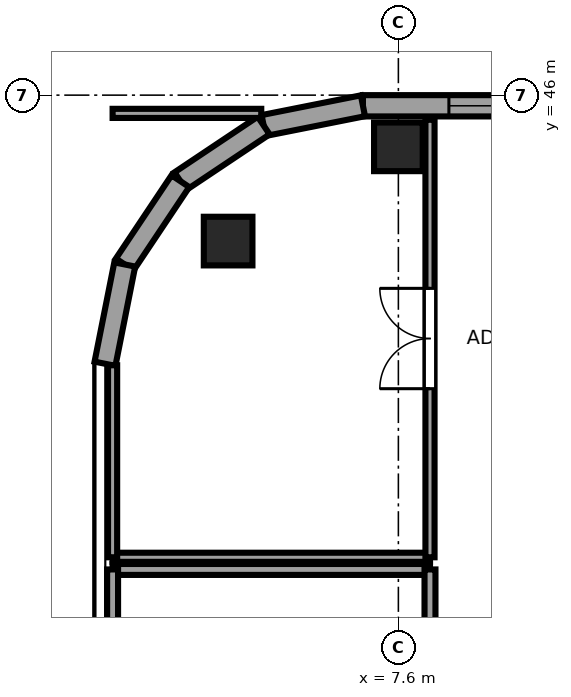
"""IFC4 building model, lengths in metres.
Left out: names, types, materials, properties, quantities, classifications, styles, units other than length and angle.
Written with IfcOpenShell. Run it as: python <this file> out.ifc"""

import sys

from ifc_helpers import new_model, si_unit, direction, frame, frame_2d, origin, origin_2d, place, context, subcontext, project, spatial, rectangle, extrude, source, transform, mapped, element, fill, save


model = new_model("IFC4")
c1 = context("Model", 3, precision=1e-05, world=origin(), true_north=direction((0.0, 1.0)))
c2 = subcontext(c1, "Body", "Model", "MODEL_VIEW")
j1 = project(units=[si_unit("LENGTHUNIT", "METRE"), si_unit("PLANEANGLEUNIT", "RADIAN")], contexts=[c1])
p1 = place(None, origin())
s1 = spatial("IfcSite", under=j1, at=p1, CompositionType="ELEMENT")
p2 = place(p1, origin())
s2 = spatial("IfcBuilding", under=s1, at=p2, CompositionType="ELEMENT")
p3 = place(p2, frame((0.0, 0.0, 194.65)))
s3 = spatial("IfcBuildingStorey", under=s2, at=p3, CompositionType="ELEMENT", Elevation=194.65)
m1 = source(origin(), c2, "Body", "SweptSolid", [
    extrude(rectangle(XDim=0.8, YDim=0.8, at=origin_2d()), origin(), (0.0, 0.0, 1.0), 3.55),
])
for number, where, z_axis, x_axis in (
    (1, (4.8, 43.6, 0.0), (0.0, 0.0, 1.0), (1.0, 0.0, 0.0)),
    (2, (7.6, 45.15, 0.0), (0.0, 0.0, 1.0), (1.0, 0.0, 0.0)),
):
    element("IfcColumn", number, at=place(p3, frame(where, z_axis=z_axis, x_axis=x_axis)), inside=s3, PredefinedType="COLUMN", context=c2, shape_type="MappedRepresentation", body=[
        mapped(m1, transform((0.0, 0.0, 0.0), x_axis=(1.0, 0.0, 0.0), y_axis=(0.0, 1.0, 0.0), z_axis=(0.0, 0.0, 1.0), scale=1.0)),
    ])
p4 = place(p3, frame((49.983, 45.825, 0.0), z_axis=(0.0, 0.0, 1.0), x_axis=(-1.0, 0.0, 0.0)))
e3 = element("IfcWall", 3, at=p4, inside=s3, PredefinedType="SOLIDWALL", context=c2, shape_type="SweptSolid", body=[
    extrude(rectangle(XDim=42.966, YDim=0.35, at=frame_2d((21.483, 0.0))), origin(), (0.0, 0.0, 1.0), 3.37),
])
p5 = place(p4, frame((1.963, 0.0, 0.68)))
e4 = element("IfcOpeningElement", 4, at=p5, cuts=e3, PredefinedType="OPENING", context=c2, shape_type="SweptSolid", body=[
    extrude(rectangle(XDim=2.55, YDim=1.92, at=frame_2d((1.275, 0.96))), frame((0.0, 0.185, 0.0), z_axis=(0.0, -1.0, 0.0), x_axis=(1.0, 0.0, 0.0)), (0.0, 0.0, 1.0), 0.37),
])
p6 = place(p4, frame((9.766, 0.0, 0.68)))
e5 = element("IfcOpeningElement", 5, at=p6, cuts=e3, PredefinedType="OPENING", context=c2, shape_type="SweptSolid", body=[
    extrude(rectangle(XDim=2.55, YDim=1.92, at=frame_2d((1.275, 0.96))), frame((0.0, 0.185, 0.0), z_axis=(0.0, -1.0, 0.0), x_axis=(1.0, 0.0, 0.0)), (0.0, 0.0, 1.0), 0.37),
])
p7 = place(p4, frame((13.943, 0.0, 0.68)))
e6 = element("IfcOpeningElement", 6, at=p7, cuts=e3, PredefinedType="OPENING", context=c2, shape_type="SweptSolid", body=[
    extrude(rectangle(XDim=2.55, YDim=1.92, at=frame_2d((1.275, 0.96))), frame((0.0, 0.185, 0.0), z_axis=(0.0, -1.0, 0.0), x_axis=(1.0, 0.0, 0.0)), (0.0, 0.0, 1.0), 0.37),
])
p8 = place(p4, frame((18.12, 0.0, 0.68)))
e7 = element("IfcOpeningElement", 7, at=p8, cuts=e3, PredefinedType="OPENING", context=c2, shape_type="SweptSolid", body=[
    extrude(rectangle(XDim=2.55, YDim=1.92, at=frame_2d((1.275, 0.96))), frame((0.0, 0.185, 0.0), z_axis=(0.0, -1.0, 0.0), x_axis=(1.0, 0.0, 0.0)), (0.0, 0.0, 1.0), 0.37),
])
p9 = place(p4, frame((22.296, 0.0, 0.68)))
e8 = element("IfcOpeningElement", 8, at=p9, cuts=e3, PredefinedType="OPENING", context=c2, shape_type="SweptSolid", body=[
    extrude(rectangle(XDim=2.55, YDim=1.92, at=frame_2d((1.275, 0.96))), frame((0.0, 0.185, 0.0), z_axis=(0.0, -1.0, 0.0), x_axis=(1.0, 0.0, 0.0)), (0.0, 0.0, 1.0), 0.37),
])
p10 = place(p4, frame((26.473, 0.0, 0.68)))
e9 = element("IfcOpeningElement", 9, at=p10, cuts=e3, PredefinedType="OPENING", context=c2, shape_type="SweptSolid", body=[
    extrude(rectangle(XDim=2.55, YDim=1.92, at=frame_2d((1.275, 0.96))), frame((0.0, 0.185, 0.0), z_axis=(0.0, -1.0, 0.0), x_axis=(1.0, 0.0, 0.0)), (0.0, 0.0, 1.0), 0.37),
])
p11 = place(p4, frame((30.649, 0.0, 0.68)))
e10 = element("IfcOpeningElement", 10, at=p11, cuts=e3, PredefinedType="OPENING", context=c2, shape_type="SweptSolid", body=[
    extrude(rectangle(XDim=2.55, YDim=1.92, at=frame_2d((1.275, 0.96))), frame((0.0, 0.185, 0.0), z_axis=(0.0, -1.0, 0.0), x_axis=(1.0, 0.0, 0.0)), (0.0, 0.0, 1.0), 0.37),
])
p12 = place(p4, frame((34.826, 0.0, 0.68)))
e11 = element("IfcOpeningElement", 11, at=p12, cuts=e3, PredefinedType="OPENING", context=c2, shape_type="SweptSolid", body=[
    extrude(rectangle(XDim=2.55, YDim=1.92, at=frame_2d((1.275, 0.96))), frame((0.0, 0.185, 0.0), z_axis=(0.0, -1.0, 0.0), x_axis=(1.0, 0.0, 0.0)), (0.0, 0.0, 1.0), 0.37),
])
p13 = place(p4, frame((39.002, 0.0, 0.68)))
e12 = element("IfcOpeningElement", 12, at=p13, cuts=e3, PredefinedType="OPENING", context=c2, shape_type="SweptSolid", body=[
    extrude(rectangle(XDim=2.55, YDim=1.92, at=frame_2d((1.275, 0.96))), frame((0.0, 0.185, 0.0), z_axis=(0.0, -1.0, 0.0), x_axis=(1.0, 0.0, 0.0)), (0.0, 0.0, 1.0), 0.37),
])
p14 = place(p3, frame((7.017, 45.825, 0.0), z_axis=(0.0, 0.0, 1.0), x_axis=(-0.980788844421, -0.195072403631, 0.0)))
e13 = element("IfcWall", 13, at=p14, inside=s3, PredefinedType="SOLIDWALL", context=c2, shape_type="SweptSolid", body=[
    extrude(rectangle(XDim=1.665, YDim=0.35, at=frame_2d((0.832, 0.0))), origin(), (0.0, 0.0, 1.0), 3.37),
])
for number, where, z_axis, x_axis in (
    (14, (5.385, 45.5, 0.0), (0.0, 0.0, 1.0), (-0.832, -0.556, 0.0)),
    (15, (4.015, 44.585, 0.0), (0.0, 0.0, 1.0), (-0.556, -0.831, 0.0)),
):
    element("IfcWall", number, at=place(p3, frame(where, z_axis=z_axis, x_axis=x_axis)), inside=s3, PredefinedType="SOLIDWALL", context=c2, shape_type="SweptSolid", body=[
        extrude(rectangle(XDim=1.647, YDim=0.35, at=frame_2d((0.824, 0.0))), origin(), (0.0, 0.0, 1.0), 2.832),
    ])
p15 = place(p3, frame((3.1, 43.216, 0.0), z_axis=(0.0, 0.0, 1.0), x_axis=(-0.195044345786, -0.980794424524, 0.0)))
e16 = element("IfcWall", 16, at=p15, inside=s3, PredefinedType="SOLIDWALL", context=c2, shape_type="SweptSolid", body=[
    extrude(rectangle(XDim=1.665, YDim=0.35, at=frame_2d((0.833, 0.0))), origin(), (0.0, 0.0, 1.0), 3.37),
])
p16 = place(p3, frame((2.9, 38.2, 0.0), z_axis=(0.0, 0.0, 1.0), x_axis=(1.0, 0.0, 0.0)))
e17 = element("IfcWall", 17, at=p16, inside=s3, PredefinedType="PARTITIONING", context=c2, shape_type="SweptSolid", body=[
    extrude(rectangle(XDim=5.22, YDim=0.18, at=frame_2d((2.61, 0.0))), origin(), (0.0, 0.0, 1.0), 3.37),
])
p17 = place(p3, frame((2.9, 31.4, 0.0), z_axis=(0.0, 0.0, 1.0), x_axis=(0.0, 1.0, 0.0)))
e18 = element("IfcWall", 18, at=p17, inside=s3, PredefinedType="PARTITIONING", context=c2, shape_type="SweptSolid", body=[
    extrude(rectangle(XDim=6.8, YDim=0.18, at=frame_2d((3.4, 0.0))), origin(), (0.0, 0.0, 1.0), 3.37),
])
p18 = place(p3, frame((8.12, 31.4, 0.0), z_axis=(0.0, 0.0, 1.0), x_axis=(0.0, 1.0, 0.0)))
e19 = element("IfcWall", 19, at=p18, inside=s3, PredefinedType="PARTITIONING", context=c2, shape_type="SweptSolid", body=[
    extrude(rectangle(XDim=6.8, YDim=0.18, at=frame_2d((3.4, 0.0))), origin(), (0.0, 0.0, 1.0), 3.37),
])
p19 = place(p18, frame((3.175, 0.0, 0.0)))
e20 = element("IfcOpeningElement", 20, at=p19, cuts=e19, PredefinedType="OPENING", context=c2, shape_type="SweptSolid", body=[
    extrude(rectangle(XDim=1.65, YDim=2.15, at=frame_2d((0.825, 1.075))), frame((0.0, 0.1, 0.0), z_axis=(0.0, -1.0, 0.0), x_axis=(1.0, 0.0, 0.0)), (0.0, 0.0, 1.0), 0.2),
])
p20 = place(p3, frame((2.9, 38.4, 0.0), z_axis=(0.0, 0.0, 1.0), x_axis=(1.0, 0.0, 0.0)))
e21 = element("IfcWall", 21, at=p20, inside=s3, PredefinedType="PARTITIONING", context=c2, shape_type="SweptSolid", body=[
    extrude(rectangle(XDim=5.22, YDim=0.15, at=frame_2d((2.61, 0.0))), origin(), (0.0, 0.0, 1.0), 3.37),
])
p21 = place(p3, frame((2.9, 45.7, 0.0), z_axis=(0.0, 0.0, 1.0), x_axis=(1.0, 0.0, 0.0)))
e22 = element("IfcWall", 22, at=p21, inside=s3, PredefinedType="PARTITIONING", context=c2, shape_type="SweptSolid", body=[
    extrude(rectangle(XDim=2.445, YDim=0.15, at=frame_2d((1.223, 0.0))), origin(), (0.0, 0.0, 1.0), 3.37),
])
p22 = place(p3, frame((2.9, 38.4, 0.0), z_axis=(0.0, 0.0, 1.0), x_axis=(0.0, 1.0, 0.0)))
e23 = element("IfcWall", 23, at=p22, inside=s3, PredefinedType="PARTITIONING", context=c2, shape_type="SweptSolid", body=[
    extrude(rectangle(XDim=3.158, YDim=0.15, at=frame_2d((1.579, 0.0))), origin(), (0.0, 0.0, 1.0), 3.37),
])
p23 = place(p3, frame((8.12, 38.4, 0.0), z_axis=(0.0, 0.0, 1.0), x_axis=(0.0, 1.0, 0.0)))
e24 = element("IfcWall", 24, at=p23, inside=s3, PredefinedType="PARTITIONING", context=c2, shape_type="SweptSolid", body=[
    extrude(rectangle(XDim=7.195, YDim=0.15, at=frame_2d((3.598, 0.0))), origin(), (0.0, 0.0, 1.0), 3.37),
])
p24 = place(p23, frame((2.772, 0.0, 0.0)))
e25 = element("IfcOpeningElement", 25, at=p24, cuts=e24, PredefinedType="OPENING", context=c2, shape_type="SweptSolid", body=[
    extrude(rectangle(XDim=1.65, YDim=2.15, at=frame_2d((0.825, 1.075))), frame((0.0, 0.085, 0.0), z_axis=(0.0, -1.0, 0.0), x_axis=(1.0, 0.0, 0.0)), (0.0, 0.0, 1.0), 0.17),
])
m2 = source(origin(), c2, "Body", "SweptSolid", [
    extrude(rectangle(XDim=2.55, YDim=1.92, at=frame_2d((1.275, 0.96))), frame((0.0, 0.09, 0.0), z_axis=(0.0, -1.0, 0.0), x_axis=(1.0, 0.0, 0.0)), (0.0, 0.0, 1.0), 0.06),
])
p25 = place(p13, origin())
e26 = element("IfcWindow", 26, at=p25, inside=s3, PartitioningType="TRIPLE_PANEL_HORIZONTAL", PredefinedType="WINDOW", context=c2, shape_type="MappedRepresentation", body=[
    mapped(m2, transform((0.0, 0.0, 0.0), x_axis=(1.0, 0.0, 0.0), y_axis=(0.0, 1.0, 0.0), z_axis=(0.0, 0.0, 1.0), scale=1.0)),
])
fill(e12, e26)
m3 = source(origin(), c2, "Body", "SweptSolid", [
    extrude(rectangle(XDim=1.65, YDim=2.15, at=frame_2d((0.825, 1.075))), frame((0.0, 0.025, 0.0), z_axis=(0.0, -1.0, 0.0), x_axis=(1.0, 0.0, 0.0)), (0.0, 0.0, 1.0), 0.05),
])
p26 = place(p24, origin())
e27 = element("IfcDoor", 27, at=p26, inside=s3, OperationType="DOUBLE_DOOR_SINGLE_SWING", PredefinedType="DOOR", context=c2, shape_type="MappedRepresentation", body=[
    mapped(m3, transform((0.0, 0.0, 0.0), x_axis=(1.0, 0.0, 0.0), y_axis=(0.0, 1.0, 0.0), z_axis=(0.0, 0.0, 1.0), scale=1.0)),
])
fill(e25, e27)
save(model, sys.argv[1])
